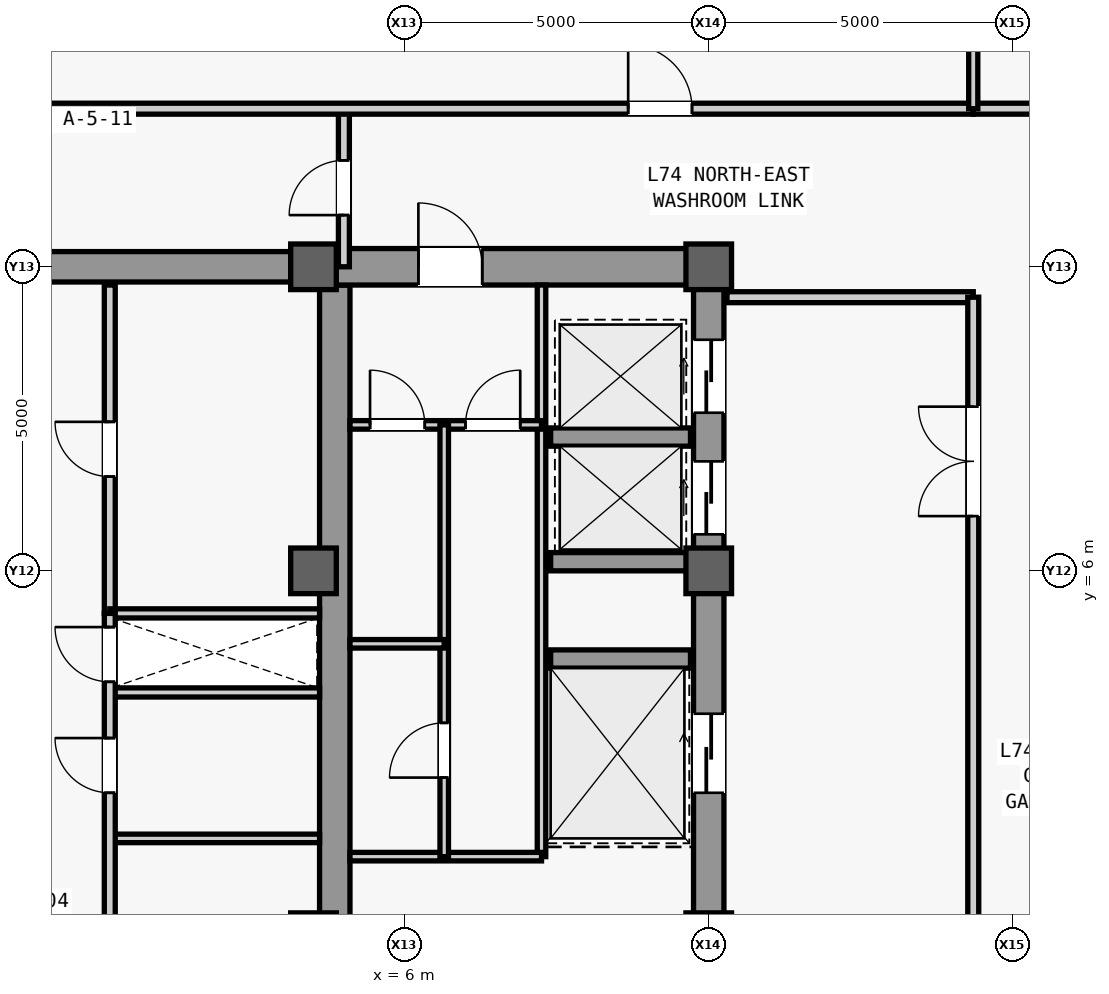
"""IFC4 building model, lengths in metres.
Left out: names, types, materials, properties, quantities, classifications, styles, units other than length and angle.
Written with IfcOpenShell. Run it as: python <this file> out.ifc"""

import sys

from ifc_helpers import new_model, si_unit, direction, frame, frame_2d, origin, origin_2d, place, context, subcontext, project, spatial, rectangle, extrude, source, transform, mapped, element, fill, save


model = new_model("IFC4")
c1 = context("Model", 3, precision=1e-05, world=origin(), true_north=direction((0.0, 1.0)))
c2 = subcontext(c1, "Body", "Model", "MODEL_VIEW")
j1 = project(units=[si_unit("LENGTHUNIT", "METRE"), si_unit("PLANEANGLEUNIT", "RADIAN")], contexts=[c1])
p1 = place(None, origin())
s1 = spatial("IfcSite", under=j1, at=p1, CompositionType="ELEMENT")
p2 = place(p1, origin())
s2 = spatial("IfcBuilding", under=s1, at=p2, CompositionType="ELEMENT")
p3 = place(p2, frame((0.0, 0.0, 313.5)))
s3 = spatial("IfcBuildingStorey", under=s2, at=p3, CompositionType="ELEMENT", Elevation=313.5)
m1 = source(origin(), c2, "Body", "SweptSolid", [
    extrude(rectangle(XDim=22.0, YDim=0.5, at=frame_2d((11.0, 0.0))), origin(), (0.0, 0.0, 1.0), 3.78),
])
p4 = place(p3, frame((11.0, -11.0, 0.0), z_axis=(0.0, 0.0, 1.0), x_axis=(0.0, 1.0, 0.0)))
e1 = element("IfcWall", 1, at=p4, inside=s3, PredefinedType="SHEAR", context=c2, shape_type="MappedRepresentation", body=[
    mapped(m1, transform((0.0, 0.0, 0.0), scale=1.0)),
])
m2 = source(origin(), c2, "Body", "SweptSolid", [
    extrude(rectangle(XDim=1.1, YDim=2.2, at=frame_2d((0.55, 1.1))), frame((0.0, 0.26, 0.0), z_axis=(0.0, -1.0, 0.0), x_axis=(1.0, 0.0, 0.0)), (0.0, 0.0, 1.0), 0.52),
])
p5 = place(p4, frame((0.8, 0.0, 0.0)))
e2 = element("IfcOpeningElement", 2, at=p5, cuts=e1, PredefinedType="OPENING", context=c2, shape_type="MappedRepresentation", body=[
    mapped(m2, transform((0.0, 0.0, 0.0), scale=1.0)),
])
m3 = source(origin(), c2, "Body", "SweptSolid", [
    extrude(rectangle(XDim=0.9, YDim=2.15, at=frame_2d((0.45, 1.075))), frame((0.0, 0.26, 0.0), z_axis=(0.0, -1.0, 0.0), x_axis=(1.0, 0.0, 0.0)), (0.0, 0.0, 1.0), 0.52),
])
p6 = place(p4, frame((6.85, 0.0, 0.0)))
e3 = element("IfcOpeningElement", 3, at=p6, cuts=e1, PredefinedType="OPENING", context=c2, shape_type="MappedRepresentation", body=[
    mapped(m3, transform((0.0, 0.0, 0.0), scale=1.0)),
])
m4 = source(origin(), c2, "Body", "SweptSolid", [
    extrude(rectangle(XDim=1.2, YDim=2.3, at=frame_2d((0.6, 1.15))), frame((0.0, 0.26, 0.0), z_axis=(0.0, -1.0, 0.0), x_axis=(1.0, 0.0, 0.0)), (0.0, 0.0, 1.0), 0.52),
])
p7 = place(p4, frame((17.6, 0.0, 0.0)))
e4 = element("IfcOpeningElement", 4, at=p7, cuts=e1, PredefinedType="OPENING", context=c2, shape_type="MappedRepresentation", body=[
    mapped(m4, transform((0.0, 0.0, 0.0), scale=1.0)),
])
p8 = place(p4, frame((19.6, 0.0, 0.0)))
e5 = element("IfcOpeningElement", 5, at=p8, cuts=e1, PredefinedType="OPENING", context=c2, shape_type="MappedRepresentation", body=[
    mapped(m4, transform((0.0, 0.0, 0.0), scale=1.0)),
])
m5 = source(origin(), c2, "Body", "SweptSolid", [
    extrude(rectangle(XDim=1.3, YDim=2.3, at=frame_2d((0.65, 1.15))), frame((0.0, 0.26, 0.0), z_axis=(0.0, -1.0, 0.0), x_axis=(1.0, 0.0, 0.0)), (0.0, 0.0, 1.0), 0.52),
])
p9 = place(p4, frame((2.7, 0.0, 0.0)))
e6 = element("IfcOpeningElement", 6, at=p9, cuts=e1, PredefinedType="OPENING", context=c2, shape_type="MappedRepresentation", body=[
    mapped(m5, transform((0.0, 0.0, 0.0), scale=1.0)),
])
p10 = place(p4, frame((13.35, 0.0, 0.0)))
e7 = element("IfcOpeningElement", 7, at=p10, cuts=e1, PredefinedType="OPENING", context=c2, shape_type="MappedRepresentation", body=[
    mapped(m5, transform((0.0, 0.0, 0.0), scale=1.0)),
])
m6 = source(origin(), c2, "Body", "SweptSolid", [
    extrude(rectangle(XDim=21.4, YDim=0.5, at=frame_2d((10.7, 0.0))), origin(), (0.0, 0.0, 1.0), 3.78),
])
p11 = place(p3, frame((4.85, -10.7, 0.0), z_axis=(0.0, 0.0, 1.0), x_axis=(0.0, 1.0, 0.0)))
e8 = element("IfcWall", 8, at=p11, inside=s3, PredefinedType="SHEAR", context=c2, shape_type="MappedRepresentation", body=[
    mapped(m6, transform((0.0, 0.0, 0.0), scale=1.0)),
])
m7 = source(origin(), c2, "Body", "SweptSolid", [
    extrude(rectangle(XDim=5.9, YDim=0.6, at=frame_2d((2.95, 0.0))), origin(), (0.0, 0.0, 1.0), 3.78),
])
p12 = place(p3, frame((4.85, 11.0, 0.0), z_axis=(0.0, 0.0, 1.0), x_axis=(1.0, 0.0, 0.0)))
e9 = element("IfcWall", 9, at=p12, inside=s3, PredefinedType="SHEAR", context=c2, shape_type="MappedRepresentation", body=[
    mapped(m7, transform((0.0, 0.0, 0.0), scale=1.0)),
])
m8 = source(origin(), c2, "Body", "SweptSolid", [
    extrude(rectangle(XDim=1.05, YDim=2.2, at=frame_2d((0.525, 1.1))), frame((0.0, 0.31, 0.0), z_axis=(0.0, -1.0, 0.0), x_axis=(1.0, 0.0, 0.0)), (0.0, 0.0, 1.0), 0.62),
])
p13 = place(p12, frame((1.375, 0.0, 0.0)))
e10 = element("IfcOpeningElement", 10, at=p13, cuts=e9, PredefinedType="OPENING", context=c2, shape_type="MappedRepresentation", body=[
    mapped(m8, transform((0.0, 0.0, 0.0), scale=1.0)),
])
m9 = source(origin(), c2, "Body", "SweptSolid", [
    extrude(rectangle(XDim=9.2, YDim=0.5, at=frame_2d((4.6, 0.0))), origin(), (0.0, 0.0, 1.0), 3.78),
])
p14 = place(p3, frame((-4.6, 11.0, 0.0), z_axis=(0.0, 0.0, 1.0), x_axis=(1.0, 0.0, 0.0)))
e11 = element("IfcWall", 11, at=p14, inside=s3, PredefinedType="SHEAR", context=c2, shape_type="MappedRepresentation", body=[
    mapped(m9, transform((0.0, 0.0, 0.0), scale=1.0)),
])
m10 = source(origin(), c2, "Body", "SweptSolid", [
    extrude(rectangle(XDim=0.75, YDim=0.75, at=origin_2d()), origin(), (0.0, 0.0, 1.0), 4.0),
])
for number, where, z_axis, x_axis in (
    (12, (4.5, 0.0, 0.0), (0.0, 0.0, 1.0), (1.0, 0.0, 0.0)),
    (13, (4.5, 6.0, 0.0), (0.0, 0.0, 1.0), (1.0, 0.0, 0.0)),
    (14, (4.5, 11.0, 0.0), (0.0, 0.0, 1.0), (1.0, 0.0, 0.0)),
    (15, (11.0, 0.0, 0.0), (0.0, 0.0, 1.0), (1.0, 0.0, 0.0)),
    (16, (11.0, 6.0, 0.0), (0.0, 0.0, 1.0), (1.0, 0.0, 0.0)),
    (17, (11.0, 11.0, 0.0), (0.0, 0.0, 1.0), (1.0, 0.0, 0.0)),
):
    element("IfcColumn", number, at=place(p3, frame(where, z_axis=z_axis, x_axis=x_axis)), inside=s3, PredefinedType="COLUMN", context=c2, shape_type="MappedRepresentation", body=[
        mapped(m10, transform((0.0, 0.0, 0.0), scale=1.0)),
    ])
m11 = source(origin(), c2, "Body", "SweptSolid", [
    extrude(rectangle(XDim=2.3, YDim=0.3, at=frame_2d((1.15, 0.0))), origin(), (0.0, 0.0, 1.0), 3.78),
])
for number, where, z_axis, x_axis in (
    (18, (8.4, 4.55, 0.0), (0.0, 0.0, 1.0), (1.0, 0.0, 0.0)),
    (19, (8.4, 6.15, 0.0), (0.0, 0.0, 1.0), (1.0, 0.0, 0.0)),
    (20, (8.4, 8.2, 0.0), (0.0, 0.0, 1.0), (1.0, 0.0, 0.0)),
):
    element("IfcWall", number, at=place(p3, frame(where, z_axis=z_axis, x_axis=x_axis)), inside=s3, PredefinedType="SHEAR", context=c2, shape_type="MappedRepresentation", body=[
        mapped(m11, transform((0.0, 0.0, 0.0), scale=1.0)),
    ])
m12 = source(origin(), c2, "Body", "SweptSolid", [
    extrude(rectangle(XDim=9.4, YDim=0.14, at=frame_2d((4.7, 0.0))), origin(), (0.0, 0.0, 1.0), 3.78),
])
p15 = place(p3, frame((8.25, 1.3, 0.0), z_axis=(0.0, 0.0, 1.0), x_axis=(0.0, 1.0, 0.0)))
e21 = element("IfcWall", 21, at=p15, inside=s3, PredefinedType="PARTITIONING", context=c2, shape_type="MappedRepresentation", body=[
    mapped(m12, transform((0.0, 0.0, 0.0), scale=1.0)),
])
m13 = source(origin(), c2, "Body", "SweptSolid", [
    extrude(rectangle(XDim=3.15, YDim=0.14, at=frame_2d((1.575, 0.0))), origin(), (0.0, 0.0, 1.0), 3.78),
])
p16 = place(p3, frame((5.1, 1.3, 0.0), z_axis=(0.0, 0.0, 1.0), x_axis=(1.0, 0.0, 0.0)))
e22 = element("IfcWall", 22, at=p16, inside=s3, PredefinedType="PARTITIONING", context=c2, shape_type="MappedRepresentation", body=[
    mapped(m13, transform((0.0, 0.0, 0.0), scale=1.0)),
])
p17 = place(p3, frame((5.1, 8.4, 0.0), z_axis=(0.0, 0.0, 1.0), x_axis=(1.0, 0.0, 0.0)))
e23 = element("IfcWall", 23, at=p17, inside=s3, PredefinedType="PARTITIONING", context=c2, shape_type="MappedRepresentation", body=[
    mapped(m13, transform((0.0, 0.0, 0.0), scale=1.0)),
])
m14 = source(origin(), c2, "Body", "SweptSolid", [
    extrude(rectangle(XDim=0.9, YDim=2.15, at=frame_2d((0.45, 1.075))), frame((0.0, 0.08, 0.0), z_axis=(0.0, -1.0, 0.0), x_axis=(1.0, 0.0, 0.0)), (0.0, 0.0, 1.0), 0.16),
])
p18 = place(p17, frame((0.33, 0.0, 0.0)))
e24 = element("IfcOpeningElement", 24, at=p18, cuts=e23, PredefinedType="OPENING", context=c2, shape_type="MappedRepresentation", body=[
    mapped(m14, transform((0.0, 0.0, 0.0), scale=1.0)),
])
p19 = place(p17, frame((1.9, 0.0, 0.0)))
e25 = element("IfcOpeningElement", 25, at=p19, cuts=e23, PredefinedType="OPENING", context=c2, shape_type="MappedRepresentation", body=[
    mapped(m14, transform((0.0, 0.0, 0.0), scale=1.0)),
])
m15 = source(origin(), c2, "Body", "SweptSolid", [
    extrude(rectangle(XDim=7.1, YDim=0.14, at=frame_2d((3.55, 0.0))), origin(), (0.0, 0.0, 1.0), 3.78),
])
p20 = place(p3, frame((6.65, 1.3, 0.0), z_axis=(0.0, 0.0, 1.0), x_axis=(0.0, 1.0, 0.0)))
e26 = element("IfcWall", 26, at=p20, inside=s3, PredefinedType="PARTITIONING", context=c2, shape_type="MappedRepresentation", body=[
    mapped(m15, transform((0.0, 0.0, 0.0), scale=1.0)),
])
p21 = place(p20, frame((1.3, 0.0, 0.0)))
e27 = element("IfcOpeningElement", 27, at=p21, cuts=e26, PredefinedType="OPENING", context=c2, shape_type="MappedRepresentation", body=[
    mapped(m14, transform((0.0, 0.0, 0.0), scale=1.0)),
])
m16 = source(origin(), c2, "Body", "SweptSolid", [
    extrude(rectangle(XDim=1.55, YDim=0.14, at=frame_2d((0.775, 0.0))), origin(), (0.0, 0.0, 1.0), 3.78),
])
p22 = place(p3, frame((5.1, 4.8, 0.0), z_axis=(0.0, 0.0, 1.0), x_axis=(1.0, 0.0, 0.0)))
e28 = element("IfcWall", 28, at=p22, inside=s3, PredefinedType="PARTITIONING", context=c2, shape_type="MappedRepresentation", body=[
    mapped(m16, transform((0.0, 0.0, 0.0), scale=1.0)),
])
m17 = source(origin(), c2, "Body", "SweptSolid", [
    extrude(rectangle(XDim=4.05, YDim=0.18, at=frame_2d((2.025, 0.0))), origin(), (0.0, 0.0, 1.0), 3.78),
])
p23 = place(p3, frame((11.3, 10.5, 0.0), z_axis=(0.0, 0.0, 1.0), x_axis=(1.0, 0.0, 0.0)))
e29 = element("IfcWall", 29, at=p23, inside=s3, PredefinedType="PARTITIONING", context=c2, shape_type="MappedRepresentation", body=[
    mapped(m17, transform((0.0, 0.0, 0.0), scale=1.0)),
])
m18 = source(origin(), c2, "Body", "SweptSolid", [
    extrude(rectangle(XDim=16.6, YDim=0.18, at=frame_2d((8.3, 0.0))), origin(), (0.0, 0.0, 1.0), 3.78),
])
p24 = place(p3, frame((15.35, -6.1, 0.0), z_axis=(0.0, 0.0, 1.0), x_axis=(0.0, 1.0, 0.0)))
e30 = element("IfcWall", 30, at=p24, inside=s3, PredefinedType="PARTITIONING", context=c2, shape_type="MappedRepresentation", body=[
    mapped(m18, transform((0.0, 0.0, 0.0), scale=1.0)),
])
m19 = source(origin(), c2, "Body", "SweptSolid", [
    extrude(rectangle(XDim=1.8, YDim=2.25, at=frame_2d((0.9, 1.125))), frame((0.0, 0.1, 0.0), z_axis=(0.0, -1.0, 0.0), x_axis=(1.0, 0.0, 0.0)), (0.0, 0.0, 1.0), 0.2),
])
p25 = place(p24, frame((2.7, 0.0, 0.0)))
e31 = element("IfcOpeningElement", 31, at=p25, cuts=e30, PredefinedType="OPENING", context=c2, shape_type="MappedRepresentation", body=[
    mapped(m19, transform((0.0, 0.0, 0.0), scale=1.0)),
])
p26 = place(p24, frame((13.0, 0.0, 0.0)))
e32 = element("IfcOpeningElement", 32, at=p26, cuts=e30, PredefinedType="OPENING", context=c2, shape_type="MappedRepresentation", body=[
    mapped(m19, transform((0.0, 0.0, 0.0), scale=1.0)),
])
m20 = source(origin(), c2, "Body", "SweptSolid", [
    extrude(rectangle(XDim=3.45, YDim=0.15, at=frame_2d((1.725, 0.0))), origin(), (0.0, 0.0, 1.0), 3.78),
])
p27 = place(p3, frame((1.15, 4.0, 0.0), z_axis=(0.0, 0.0, 1.0), x_axis=(1.0, 0.0, 0.0)))
e33 = element("IfcWall", 33, at=p27, inside=s3, PredefinedType="PARTITIONING", context=c2, shape_type="MappedRepresentation", body=[
    mapped(m20, transform((0.0, 0.0, 0.0), scale=1.0)),
])
m21 = source(origin(), c2, "Body", "SweptSolid", [
    extrude(rectangle(XDim=5.4, YDim=0.18, at=frame_2d((2.7, 0.0))), origin(), (0.0, 0.0, 1.0), 3.78),
])
p28 = place(p3, frame((1.15, 5.3, 0.0), z_axis=(0.0, 0.0, 1.0), x_axis=(0.0, 1.0, 0.0)))
e34 = element("IfcWall", 34, at=p28, inside=s3, PredefinedType="PARTITIONING", context=c2, shape_type="MappedRepresentation", body=[
    mapped(m21, transform((0.0, 0.0, 0.0), scale=1.0)),
])
m22 = source(origin(), c2, "Body", "SweptSolid", [
    extrude(rectangle(XDim=0.9, YDim=2.15, at=frame_2d((0.45, 1.075))), frame((0.0, 0.1, 0.0), z_axis=(0.0, -1.0, 0.0), x_axis=(1.0, 0.0, 0.0)), (0.0, 0.0, 1.0), 0.2),
])
p29 = place(p28, frame((2.25, 0.0, 0.0)))
e35 = element("IfcOpeningElement", 35, at=p29, cuts=e34, PredefinedType="OPENING", context=c2, shape_type="MappedRepresentation", body=[
    mapped(m22, transform((0.0, 0.0, 0.0), scale=1.0)),
])
p30 = place(p3, frame((1.15, 5.3, 0.0), z_axis=(0.0, 0.0, 1.0), x_axis=(1.0, 0.0, 0.0)))
e36 = element("IfcWall", 36, at=p30, inside=s3, PredefinedType="PARTITIONING", context=c2, shape_type="MappedRepresentation", body=[
    mapped(m20, transform((0.0, 0.0, 0.0), scale=1.0)),
])
m23 = source(origin(), c2, "Body", "SweptSolid", [
    extrude(rectangle(XDim=3.45, YDim=0.14, at=frame_2d((1.725, 0.0))), origin(), (0.0, 0.0, 1.0), 3.78),
])
p31 = place(p3, frame((1.15, 1.6, 0.0), z_axis=(0.0, 0.0, 1.0), x_axis=(1.0, 0.0, 0.0)))
e37 = element("IfcWall", 37, at=p31, inside=s3, PredefinedType="PARTITIONING", context=c2, shape_type="MappedRepresentation", body=[
    mapped(m23, transform((0.0, 0.0, 0.0), scale=1.0)),
])
m24 = source(origin(), c2, "Body", "SweptSolid", [
    extrude(rectangle(XDim=10.6, YDim=0.18, at=frame_2d((5.3, 0.0))), origin(), (0.0, 0.0, 1.0), 3.78),
])
p32 = place(p3, frame((1.15, -5.3, 0.0), z_axis=(0.0, 0.0, 1.0), x_axis=(0.0, 1.0, 0.0)))
e38 = element("IfcWall", 38, at=p32, inside=s3, PredefinedType="PARTITIONING", context=c2, shape_type="MappedRepresentation", body=[
    mapped(m24, transform((0.0, 0.0, 0.0), scale=1.0)),
])
p33 = place(p32, frame((1.15, 0.0, 0.0)))
e39 = element("IfcOpeningElement", 39, at=p33, cuts=e38, PredefinedType="OPENING", context=c2, shape_type="MappedRepresentation", body=[
    mapped(m22, transform((0.0, 0.0, 0.0), scale=1.0)),
])
p34 = place(p32, frame((4.6, 0.0, 0.0)))
e40 = element("IfcOpeningElement", 40, at=p34, cuts=e38, PredefinedType="OPENING", context=c2, shape_type="MappedRepresentation", body=[
    mapped(m22, transform((0.0, 0.0, 0.0), scale=1.0)),
])
p35 = place(p32, frame((7.65, 0.0, 0.0)))
e41 = element("IfcOpeningElement", 41, at=p35, cuts=e38, PredefinedType="OPENING", context=c2, shape_type="MappedRepresentation", body=[
    mapped(m22, transform((0.0, 0.0, 0.0), scale=1.0)),
])
p36 = place(p32, frame((9.475, 0.0, 0.0)))
e42 = element("IfcOpeningElement", 42, at=p36, cuts=e38, PredefinedType="OPENING", context=c2, shape_type="MappedRepresentation", body=[
    mapped(m22, transform((0.0, 0.0, 0.0), scale=1.0)),
])
m25 = source(origin(), c2, "Body", "SweptSolid", [
    extrude(rectangle(XDim=2.6, YDim=0.18, at=frame_2d((1.3, 0.0))), origin(), (0.0, 0.0, 1.0), 3.78),
])
p37 = place(p3, frame((5.0, 11.0, 0.0), z_axis=(0.0, 0.0, 1.0), x_axis=(0.0, 1.0, 0.0)))
e43 = element("IfcWall", 43, at=p37, inside=s3, PredefinedType="PARTITIONING", context=c2, shape_type="MappedRepresentation", body=[
    mapped(m25, transform((0.0, 0.0, 0.0), scale=1.0)),
])
p38 = place(p37, frame((0.85, 0.0, 0.0)))
e44 = element("IfcOpeningElement", 44, at=p38, cuts=e43, PredefinedType="OPENING", context=c2, shape_type="MappedRepresentation", body=[
    mapped(m22, transform((0.0, 0.0, 0.0), scale=1.0)),
])
m26 = source(origin(), c2, "Body", "SweptSolid", [
    extrude(rectangle(XDim=2.4, YDim=0.18, at=frame_2d((1.2, 0.0))), origin(), (0.0, 0.0, 1.0), 3.78),
])
p39 = place(p3, frame((15.35, 13.6, 0.0), z_axis=(0.0, 0.0, 1.0), x_axis=(1.0, 0.0, 0.0)))
e45 = element("IfcWall", 45, at=p39, inside=s3, PredefinedType="PARTITIONING", context=c2, shape_type="MappedRepresentation", body=[
    mapped(m26, transform((0.0, 0.0, 0.0), scale=1.0)),
])
m27 = source(origin(), c2, "Body", "SweptSolid", [
    extrude(rectangle(XDim=32.75, YDim=0.18, at=frame_2d((16.375, 0.0))), origin(), (0.0, 0.0, 1.0), 3.78),
])
p40 = place(p3, frame((-17.4, 13.6, 0.0), z_axis=(0.0, 0.0, 1.0), x_axis=(1.0, 0.0, 0.0)))
e46 = element("IfcWall", 46, at=p40, inside=s3, PredefinedType="PARTITIONING", context=c2, shape_type="MappedRepresentation", body=[
    mapped(m27, transform((0.0, 0.0, 0.0), scale=1.0)),
])
m28 = source(origin(), c2, "Body", "SweptSolid", [
    extrude(rectangle(XDim=1.05, YDim=2.2, at=frame_2d((0.525, 1.1))), frame((0.0, 0.1, 0.0), z_axis=(0.0, -1.0, 0.0), x_axis=(1.0, 0.0, 0.0)), (0.0, 0.0, 1.0), 0.2),
])
p41 = place(p40, frame((27.075, 0.0, 0.0)))
e47 = element("IfcOpeningElement", 47, at=p41, cuts=e46, PredefinedType="OPENING", context=c2, shape_type="MappedRepresentation", body=[
    mapped(m28, transform((0.0, 0.0, 0.0), scale=1.0)),
])
m29 = source(origin(), c2, "Body", "SweptSolid", [
    extrude(rectangle(XDim=14.4, YDim=0.15, at=frame_2d((7.2, 0.0))), origin(), (0.0, 0.0, 1.0), 3.78),
])
p42 = place(p3, frame((15.35, 13.6, 0.0), z_axis=(0.0, 0.0, 1.0), x_axis=(0.0, 1.0, 0.0)))
e48 = element("IfcWall", 48, at=p42, inside=s3, PredefinedType="PARTITIONING", context=c2, shape_type="MappedRepresentation", body=[
    mapped(m29, transform((0.0, 0.0, 0.0), scale=1.0)),
])
m30 = source(origin(), c2, "Body", "SweptSolid", [
    extrude(rectangle(XDim=1.05, YDim=2.2, at=frame_2d((0.525, 1.1))), frame((0.0, 0.025, 0.0), z_axis=(0.0, -1.0, 0.0), x_axis=(1.0, 0.0, 0.0)), (0.0, 0.0, 1.0), 0.05),
])
p43 = place(p13, origin())
e49 = element("IfcDoor", 49, at=p43, inside=s3, OperationType="SINGLE_SWING_LEFT", PredefinedType="DOOR", context=c2, shape_type="MappedRepresentation", body=[
    mapped(m30, transform((0.0, 0.0, 0.0), scale=1.0)),
])
fill(e10, e49)
m31 = source(origin(), c2, "Body", "SweptSolid", [
    extrude(rectangle(XDim=0.9, YDim=2.15, at=frame_2d((0.45, 1.075))), frame((0.0, 0.025, 0.0), z_axis=(0.0, -1.0, 0.0), x_axis=(1.0, 0.0, 0.0)), (0.0, 0.0, 1.0), 0.05),
])
p44 = place(p18, origin())
e50 = element("IfcDoor", 50, at=p44, inside=s3, OperationType="SINGLE_SWING_LEFT", PredefinedType="DOOR", context=c2, shape_type="MappedRepresentation", body=[
    mapped(m31, transform((0.0, 0.0, 0.0), scale=1.0)),
])
fill(e24, e50)
p45 = place(p19, origin())
e51 = element("IfcDoor", 51, at=p45, inside=s3, OperationType="SINGLE_SWING_RIGHT", PredefinedType="DOOR", context=c2, shape_type="MappedRepresentation", body=[
    mapped(m31, transform((0.0, 0.0, 0.0), scale=1.0)),
])
fill(e25, e51)
p46 = place(p21, origin())
e52 = element("IfcDoor", 52, at=p46, inside=s3, OperationType="SINGLE_SWING_LEFT", PredefinedType="DOOR", context=c2, shape_type="MappedRepresentation", body=[
    mapped(m31, transform((0.0, 0.0, 0.0), scale=1.0)),
])
fill(e27, e52)
m32 = source(origin(), c2, "Body", "SweptSolid", [
    extrude(rectangle(XDim=1.8, YDim=2.25, at=frame_2d((0.9, 1.125))), frame((0.0, 0.025, 0.0), z_axis=(0.0, -1.0, 0.0), x_axis=(1.0, 0.0, 0.0)), (0.0, 0.0, 1.0), 0.05),
])
p47 = place(p26, origin())
e53 = element("IfcDoor", 53, at=p47, inside=s3, OperationType="SINGLE_SWING_LEFT", PredefinedType="DOOR", context=c2, shape_type="MappedRepresentation", body=[
    mapped(m32, transform((0.0, 0.0, 0.0), scale=1.0)),
])
fill(e32, e53)
p48 = place(p29, origin())
e54 = element("IfcDoor", 54, at=p48, inside=s3, OperationType="SINGLE_SWING_RIGHT", PredefinedType="DOOR", context=c2, shape_type="MappedRepresentation", body=[
    mapped(m31, transform((0.0, 0.0, 0.0), scale=1.0)),
])
fill(e35, e54)
p49 = place(p35, origin())
e55 = element("IfcDoor", 55, at=p49, inside=s3, OperationType="SINGLE_SWING_RIGHT", PredefinedType="DOOR", context=c2, shape_type="MappedRepresentation", body=[
    mapped(m31, transform((0.0, 0.0, 0.0), scale=1.0)),
])
fill(e41, e55)
p50 = place(p36, origin())
e56 = element("IfcDoor", 56, at=p50, inside=s3, OperationType="SINGLE_SWING_RIGHT", PredefinedType="DOOR", context=c2, shape_type="MappedRepresentation", body=[
    mapped(m31, transform((0.0, 0.0, 0.0), scale=1.0)),
])
fill(e42, e56)
p51 = place(p38, origin())
e57 = element("IfcDoor", 57, at=p51, inside=s3, OperationType="SINGLE_SWING_LEFT", PredefinedType="DOOR", context=c2, shape_type="MappedRepresentation", body=[
    mapped(m31, transform((0.0, 0.0, 0.0), scale=1.0)),
])
fill(e44, e57)
p52 = place(p41, origin())
e58 = element("IfcDoor", 58, at=p52, inside=s3, OperationType="SINGLE_SWING_LEFT", PredefinedType="DOOR", context=c2, shape_type="MappedRepresentation", body=[
    mapped(m30, transform((0.0, 0.0, 0.0), scale=1.0)),
])
fill(e47, e58)
m33 = source(origin(), c2, "Body", "SweptSolid", [
    extrude(rectangle(XDim=1.2, YDim=2.3, at=frame_2d((0.6, 1.15))), frame((0.0, 0.025, 0.0), z_axis=(0.0, -1.0, 0.0), x_axis=(1.0, 0.0, 0.0)), (0.0, 0.0, 1.0), 0.05),
])
p53 = place(p7, origin())
e59 = element("IfcDoor", 59, at=p53, inside=s3, OperationType="SLIDING_TO_LEFT", PredefinedType="DOOR", context=c2, shape_type="MappedRepresentation", body=[
    mapped(m33, transform((0.0, 0.0, 0.0), scale=1.0)),
])
fill(e4, e59)
p54 = place(p8, origin())
e60 = element("IfcDoor", 60, at=p54, inside=s3, OperationType="SLIDING_TO_LEFT", PredefinedType="DOOR", context=c2, shape_type="MappedRepresentation", body=[
    mapped(m33, transform((0.0, 0.0, 0.0), scale=1.0)),
])
fill(e5, e60)
m34 = source(origin(), c2, "Body", "SweptSolid", [
    extrude(rectangle(XDim=1.3, YDim=2.3, at=frame_2d((0.65, 1.15))), frame((0.0, 0.025, 0.0), z_axis=(0.0, -1.0, 0.0), x_axis=(1.0, 0.0, 0.0)), (0.0, 0.0, 1.0), 0.05),
])
p55 = place(p10, origin())
e61 = element("IfcDoor", 61, at=p55, inside=s3, OperationType="SLIDING_TO_LEFT", PredefinedType="DOOR", context=c2, shape_type="MappedRepresentation", body=[
    mapped(m34, transform((0.0, 0.0, 0.0), scale=1.0)),
])
fill(e7, e61)
save(model, sys.argv[1])
